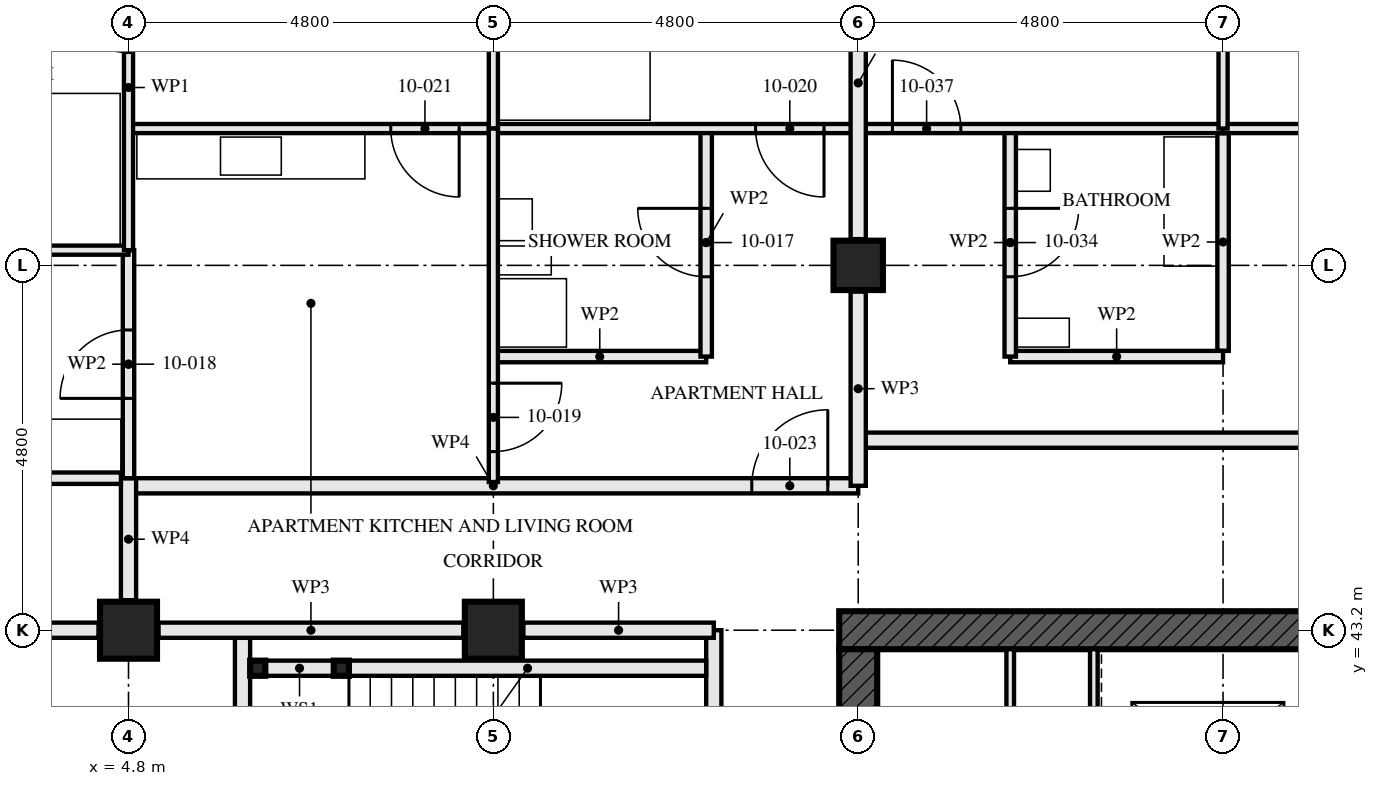
"""IFC4 building model, lengths in metres.
Left out: names, types, materials, properties, quantities, classifications, styles, units other than length and angle.
Written with IfcOpenShell. Run it as: python <this file> out.ifc"""

import sys

from ifc_helpers import new_model, si_unit, direction, frame, frame_2d, origin, origin_2d, place, context, subcontext, project, spatial, rectangle, hollow_rectangle, extrude, element, fill, save


model = new_model("IFC4")
c1 = context("Model", 3, precision=1e-05, world=origin(), true_north=direction((0.0, 1.0)))
c2 = subcontext(c1, "Body", "Model", "MODEL_VIEW")
j1 = project(units=[si_unit("LENGTHUNIT", "METRE"), si_unit("PLANEANGLEUNIT", "RADIAN")], contexts=[c1])
p1 = place(None, origin())
s1 = spatial("IfcSite", under=j1, at=p1, CompositionType="ELEMENT")
p2 = place(p1, origin())
s2 = spatial("IfcBuilding", under=s1, at=p2, CompositionType="ELEMENT")
p3 = place(p2, frame((0.0, 0.0, 41.0)))
s3 = spatial("IfcBuildingStorey", under=s2, at=p3, CompositionType="ELEMENT", Elevation=41.0)
for number, where, z_axis, x_axis in (
    (1, (4.8, 43.2, 0.0), (0.0, 0.0, 1.0), (0.0, 1.0, 0.0)),
    (2, (9.6, 43.2, 0.0), (0.0, 0.0, 1.0), (0.0, 1.0, 0.0)),
):
    element("IfcColumn", number, at=place(p3, frame(where, z_axis=z_axis, x_axis=x_axis)), inside=s3, PredefinedType="COLUMN", context=c2, shape_type="SweptSolid", body=[
        extrude(hollow_rectangle(XDim=0.75, YDim=0.75, WallThickness=0.08, at=origin_2d()), origin(), (0.0, 0.0, 1.0), 3.5),
    ])
p4 = place(p3, frame((14.4, 48.0, 0.0), z_axis=(0.0, 0.0, 1.0), x_axis=(1.0, 0.0, 0.0)))
e3 = element("IfcColumn", 3, at=p4, inside=s3, PredefinedType="COLUMN", context=c2, shape_type="SweptSolid", body=[
    extrude(hollow_rectangle(XDim=0.65, YDim=0.65, WallThickness=0.05, at=origin_2d()), origin(), (0.0, 0.0, 1.0), 3.5),
])
p5 = place(p3, frame((29.05, 43.2, -0.17), z_axis=(0.0, 0.0, 1.0), x_axis=(-1.0, 0.0, 0.0)))
e4 = element("IfcWall", 4, at=p5, inside=s3, PredefinedType="SHEAR", context=c2, shape_type="SweptSolid", body=[
    extrude(rectangle(XDim=14.9, YDim=0.5, at=frame_2d((7.45, 0.0))), origin(), (0.0, 0.0, 1.0), 3.5),
])
p6 = place(p5, frame((6.85, 0.0, 0.17)))
e5 = element("IfcOpeningElement", 5, at=p6, cuts=e4, PredefinedType="OPENING", context=c2, shape_type="SweptSolid", body=[
    extrude(rectangle(XDim=1.2, YDim=2.1, at=frame_2d((0.6, 1.05))), frame((0.0, 0.26, 0.0), z_axis=(0.0, -1.0, 0.0), x_axis=(1.0, 0.0, 0.0)), (0.0, 0.0, 1.0), 0.521),
])
p7 = place(p3, frame((14.4, 42.95, -0.17), z_axis=(0.0, 0.0, 1.0), x_axis=(0.0, -1.0, 0.0)))
e6 = element("IfcWall", 6, at=p7, inside=s3, PredefinedType="SHEAR", context=c2, shape_type="SweptSolid", body=[
    extrude(rectangle(XDim=13.9, YDim=0.5, at=frame_2d((6.95, 0.0))), origin(), (0.0, 0.0, 1.0), 3.5),
])
p8 = place(p7, frame((6.35, 0.0, 0.17)))
e7 = element("IfcOpeningElement", 7, at=p8, cuts=e6, PredefinedType="OPENING", context=c2, shape_type="SweptSolid", body=[
    extrude(rectangle(XDim=1.2, YDim=2.1, at=frame_2d((0.6, 1.05))), frame((0.0, 0.26, 0.0), z_axis=(0.0, -1.0, 0.0), x_axis=(1.0, 0.0, 0.0)), (0.0, 0.0, 1.0), 0.521),
])
for number, where, z_axis, x_axis in (
    (8, (6.5, 42.7, 0.0), (0.0, 0.0, 1.0), (1.0, 0.0, 0.0)),
    (9, (7.6, 42.7, 0.0), (0.0, 0.0, 1.0), (1.0, 0.0, 0.0)),
):
    element("IfcColumn", number, at=place(p3, frame(where, z_axis=z_axis, x_axis=x_axis)), inside=s3, PredefinedType="COLUMN", context=c2, shape_type="SweptSolid", body=[
        extrude(hollow_rectangle(XDim=0.2, YDim=0.2, WallThickness=0.008, at=origin_2d()), origin(), (0.0, 0.0, 1.0), 3.33),
    ])
p9 = place(p3, frame((6.6, 42.7, 0.0), z_axis=(0.0, 0.0, 1.0), x_axis=(1.0, 0.0, 0.0)))
e10 = element("IfcWall", 10, at=p9, inside=s3, PredefinedType="SOLIDWALL", context=c2, shape_type="SweptSolid", body=[
    extrude(rectangle(XDim=0.9, YDim=0.2, at=frame_2d((0.45, 0.0))), origin(), (0.0, 0.0, 1.0), 2.99),
])
p10 = place(p3, frame((7.7, 42.7, 0.0), z_axis=(0.0, 0.0, 1.0), x_axis=(1.0, 0.0, 0.0)))
e11 = element("IfcWall", 11, at=p10, inside=s3, PredefinedType="SOLIDWALL", context=c2, shape_type="SweptSolid", body=[
    extrude(rectangle(XDim=4.7, YDim=0.2, at=frame_2d((2.35, 0.0))), origin(), (0.0, 0.0, 1.0), 2.99),
])
p11 = place(p3, frame((6.3, 43.1, 0.0), z_axis=(0.0, 0.0, 1.0), x_axis=(0.0, -1.0, 0.0)))
e12 = element("IfcWall", 12, at=p11, inside=s3, PredefinedType="SOLIDWALL", context=c2, shape_type="SweptSolid", body=[
    extrude(rectangle(XDim=3.3, YDim=0.2, at=frame_2d((1.65, 0.0))), origin(), (0.0, 0.0, 1.0), 3.33),
])
p12 = place(p3, frame((12.5, 43.2, 0.0), z_axis=(0.0, 0.0, 1.0), x_axis=(0.0, -1.0, 0.0)))
e13 = element("IfcWall", 13, at=p12, inside=s3, PredefinedType="PARTITIONING", context=c2, shape_type="SweptSolid", body=[
    extrude(rectangle(XDim=14.4, YDim=0.2, at=frame_2d((7.2, 0.0))), origin(), (0.0, 0.0, 1.0), 2.55),
])
p13 = place(p12, frame((1.4, 0.0, 0.0)))
e14 = element("IfcOpeningElement", 14, at=p13, cuts=e13, PredefinedType="OPENING", context=c2, shape_type="SweptSolid", body=[
    extrude(rectangle(XDim=1.0, YDim=2.1, at=frame_2d((0.5, 1.05))), frame((0.0, 0.111, 0.0), z_axis=(0.0, -1.0, 0.0), x_axis=(1.0, 0.0, 0.0)), (0.0, 0.0, 1.0), 0.221),
])
p14 = place(p12, frame((10.0, 0.0, 0.0)))
e15 = element("IfcOpeningElement", 15, at=p14, cuts=e13, PredefinedType="OPENING", context=c2, shape_type="SweptSolid", body=[
    extrude(rectangle(XDim=1.0, YDim=2.1, at=frame_2d((0.5, 1.05))), frame((0.0, 0.111, 0.0), z_axis=(0.0, -1.0, 0.0), x_axis=(1.0, 0.0, 0.0)), (0.0, 0.0, 1.0), 0.221),
])
p15 = place(p3, frame((12.4, 49.8, 0.0), z_axis=(0.0, 0.0, 1.0), x_axis=(0.0, -1.0, 0.0)))
e16 = element("IfcWall", 16, at=p15, inside=s3, PredefinedType="PARTITIONING", context=c2, shape_type="SweptSolid", body=[
    extrude(rectangle(XDim=3.0, YDim=0.15, at=frame_2d((1.5, 0.0))), origin(), (0.0, 0.0, 1.0), 2.55),
])
p16 = place(p15, frame((1.05, 0.0, 0.0)))
e17 = element("IfcOpeningElement", 17, at=p16, cuts=e16, PredefinedType="OPENING", context=c2, shape_type="SweptSolid", body=[
    extrude(rectangle(XDim=0.9, YDim=2.1, at=frame_2d((0.45, 1.05))), frame((0.0, 0.085, 0.0), z_axis=(0.0, -1.0, 0.0), x_axis=(1.0, 0.0, 0.0)), (0.0, 0.0, 1.0), 0.171),
])
p17 = place(p3, frame((12.4, 46.8, 0.0), z_axis=(0.0, 0.0, 1.0), x_axis=(-1.0, 0.0, 0.0)))
e18 = element("IfcWall", 18, at=p17, inside=s3, PredefinedType="PARTITIONING", context=c2, shape_type="SweptSolid", body=[
    extrude(rectangle(XDim=2.8, YDim=0.15, at=frame_2d((1.4, 0.0))), origin(), (0.0, 0.0, 1.0), 3.33),
])
p18 = place(p3, frame((4.8, 48.2, 0.0), z_axis=(0.0, 0.0, 1.0), x_axis=(0.0, -1.0, 0.0)))
e19 = element("IfcWall", 19, at=p18, inside=s3, PredefinedType="PARTITIONING", context=c2, shape_type="SweptSolid", body=[
    extrude(rectangle(XDim=3.0, YDim=0.15, at=frame_2d((1.5, 0.0))), origin(), (0.0, 0.0, 1.0), 2.55),
])
p19 = place(p18, frame((1.05, 0.0, 0.0)))
e20 = element("IfcOpeningElement", 20, at=p19, cuts=e19, PredefinedType="OPENING", context=c2, shape_type="SweptSolid", body=[
    extrude(rectangle(XDim=0.9, YDim=2.1, at=frame_2d((0.45, 1.05))), frame((0.0, 0.085, 0.0), z_axis=(0.0, -1.0, 0.0), x_axis=(1.0, 0.0, 0.0)), (0.0, 0.0, 1.0), 0.171),
])
p20 = place(p3, frame((9.6, 49.8, 0.0), z_axis=(0.0, 0.0, 1.0), x_axis=(0.0, -1.0, 0.0)))
e21 = element("IfcWall", 21, at=p20, inside=s3, PredefinedType="PARTITIONING", context=c2, shape_type="SweptSolid", body=[
    extrude(rectangle(XDim=4.65, YDim=0.12, at=frame_2d((2.325, 0.0))), origin(), (0.0, 0.0, 1.0), 2.55),
])
p21 = place(p20, frame((3.35, 0.0, 0.0)))
e22 = element("IfcOpeningElement", 22, at=p21, cuts=e21, PredefinedType="OPENING", context=c2, shape_type="SweptSolid", body=[
    extrude(rectangle(XDim=0.9, YDim=2.1, at=frame_2d((0.45, 1.05))), frame((0.0, 0.071, 0.0), z_axis=(0.0, -1.0, 0.0), x_axis=(1.0, 0.0, 0.0)), (0.0, 0.0, 1.0), 0.141),
])
p22 = place(p3, frame((14.4, 49.8, 0.0), z_axis=(0.0, 0.0, 1.0), x_axis=(-1.0, 0.0, 0.0)))
e23 = element("IfcWall", 23, at=p22, inside=s3, PredefinedType="PARTITIONING", context=c2, shape_type="SweptSolid", body=[
    extrude(rectangle(XDim=4.8, YDim=0.12, at=frame_2d((2.4, 0.0))), origin(), (0.0, 0.0, 1.0), 3.33),
])
p23 = place(p22, frame((0.45, 0.0, 0.0)))
e24 = element("IfcOpeningElement", 24, at=p23, cuts=e23, PredefinedType="OPENING", context=c2, shape_type="SweptSolid", body=[
    extrude(rectangle(XDim=0.9, YDim=2.1, at=frame_2d((0.45, 1.05))), frame((0.0, 0.071, 0.0), z_axis=(0.0, -1.0, 0.0), x_axis=(1.0, 0.0, 0.0)), (0.0, 0.0, 1.0), 0.141),
])
p24 = place(p3, frame((9.6, 49.8, 0.0), z_axis=(0.0, 0.0, 1.0), x_axis=(-1.0, 0.0, 0.0)))
e25 = element("IfcWall", 25, at=p24, inside=s3, PredefinedType="PARTITIONING", context=c2, shape_type="SweptSolid", body=[
    extrude(rectangle(XDim=4.8, YDim=0.12, at=frame_2d((2.4, 0.0))), origin(), (0.0, 0.0, 1.0), 3.33),
])
p25 = place(p24, frame((0.45, 0.0, 0.0)))
e26 = element("IfcOpeningElement", 26, at=p25, cuts=e25, PredefinedType="OPENING", context=c2, shape_type="SweptSolid", body=[
    extrude(rectangle(XDim=0.9, YDim=2.1, at=frame_2d((0.45, 1.05))), frame((0.0, 0.071, 0.0), z_axis=(0.0, -1.0, 0.0), x_axis=(1.0, 0.0, 0.0)), (0.0, 0.0, 1.0), 0.141),
])
p26 = place(p3, frame((4.8, 48.2, 0.0), z_axis=(0.0, 0.0, 1.0), x_axis=(-1.0, 0.0, 0.0)))
e27 = element("IfcWall", 27, at=p26, inside=s3, PredefinedType="PARTITIONING", context=c2, shape_type="SweptSolid", body=[
    extrude(rectangle(XDim=4.48, YDim=0.12, at=frame_2d((2.24, 0.0))), origin(), (0.0, 0.0, 1.0), 3.33),
])
p27 = place(p3, frame((9.6, 57.28, 0.0), z_axis=(0.0, 0.0, 1.0), x_axis=(0.0, -1.0, 0.0)))
e28 = element("IfcWall", 28, at=p27, inside=s3, PredefinedType="PARTITIONING", context=c2, shape_type="SweptSolid", body=[
    extrude(rectangle(XDim=7.48, YDim=0.12, at=frame_2d((3.74, 0.0))), origin(), (0.0, 0.0, 1.0), 2.55),
])
p28 = place(p3, frame((4.8, 52.48, 0.0), z_axis=(0.0, 0.0, 1.0), x_axis=(0.0, -1.0, 0.0)))
e29 = element("IfcWall", 29, at=p28, inside=s3, PredefinedType="PARTITIONING", context=c2, shape_type="SweptSolid", body=[
    extrude(rectangle(XDim=4.28, YDim=0.12, at=frame_2d((2.14, 0.0))), origin(), (0.0, 0.0, 1.0), 3.33),
])
p29 = place(p28, frame((0.78, 0.0, 0.0)))
e30 = element("IfcOpeningElement", 30, at=p29, cuts=e29, PredefinedType="OPENING", context=c2, shape_type="SweptSolid", body=[
    extrude(rectangle(XDim=0.9, YDim=2.1, at=frame_2d((0.45, 1.05))), frame((0.0, 0.071, 0.0), z_axis=(0.0, -1.0, 0.0), x_axis=(1.0, 0.0, 0.0)), (0.0, 0.0, 1.0), 0.141),
])
p30 = place(p3, frame((14.4, 45.1, 0.0), z_axis=(0.0, 0.0, 1.0), x_axis=(-1.0, 0.0, 0.0)))
e31 = element("IfcWall", 31, at=p30, inside=s3, PredefinedType="PARTITIONING", context=c2, shape_type="SweptSolid", body=[
    extrude(rectangle(XDim=9.6, YDim=0.2, at=frame_2d((4.8, 0.0))), origin(), (0.0, 0.0, 1.0), 3.33),
])
p31 = place(p30, frame((0.4, 0.0, 0.0)))
e32 = element("IfcOpeningElement", 32, at=p31, cuts=e31, PredefinedType="OPENING", context=c2, shape_type="SweptSolid", body=[
    extrude(rectangle(XDim=1.0, YDim=2.1, at=frame_2d((0.5, 1.05))), frame((0.0, 0.111, 0.0), z_axis=(0.0, -1.0, 0.0), x_axis=(1.0, 0.0, 0.0)), (0.0, 0.0, 1.0), 0.221),
])
p32 = place(p3, frame((4.8, 45.2, 0.0), z_axis=(0.0, 0.0, 1.0), x_axis=(0.0, -1.0, 0.0)))
e33 = element("IfcWall", 33, at=p32, inside=s3, PredefinedType="PARTITIONING", context=c2, shape_type="SweptSolid", body=[
    extrude(rectangle(XDim=1.605, YDim=0.2, at=frame_2d((0.802, 0.0))), origin(), (0.0, 0.0, 1.0), 3.33),
])
p33 = place(p3, frame((16.4, 49.8, 0.0), z_axis=(0.0, 0.0, 1.0), x_axis=(0.0, -1.0, 0.0)))
e34 = element("IfcWall", 34, at=p33, inside=s3, PredefinedType="PARTITIONING", context=c2, shape_type="SweptSolid", body=[
    extrude(rectangle(XDim=3.0, YDim=0.15, at=frame_2d((1.5, 0.0))), origin(), (0.0, 0.0, 1.0), 2.55),
])
p34 = place(p33, frame((1.05, 0.0, 0.0)))
e35 = element("IfcOpeningElement", 35, at=p34, cuts=e34, PredefinedType="OPENING", context=c2, shape_type="SweptSolid", body=[
    extrude(rectangle(XDim=0.9, YDim=2.1, at=frame_2d((0.45, 1.05))), frame((0.0, 0.085, 0.0), z_axis=(0.0, -1.0, 0.0), x_axis=(1.0, 0.0, 0.0)), (0.0, 0.0, 1.0), 0.171),
])
p35 = place(p3, frame((19.2, 46.8, 0.0), z_axis=(0.0, 0.0, 1.0), x_axis=(-1.0, 0.0, 0.0)))
e36 = element("IfcWall", 36, at=p35, inside=s3, PredefinedType="PARTITIONING", context=c2, shape_type="SweptSolid", body=[
    extrude(rectangle(XDim=2.8, YDim=0.15, at=frame_2d((1.4, 0.0))), origin(), (0.0, 0.0, 1.0), 3.33),
])
p36 = place(p3, frame((24.0, 49.8, 0.0), z_axis=(0.0, 0.0, 1.0), x_axis=(-1.0, 0.0, 0.0)))
e37 = element("IfcWall", 37, at=p36, inside=s3, PredefinedType="PARTITIONING", context=c2, shape_type="SweptSolid", body=[
    extrude(rectangle(XDim=4.8, YDim=0.12, at=frame_2d((2.4, 0.0))), origin(), (0.0, 0.0, 1.0), 3.33),
])
p37 = place(p36, frame((0.45, 0.0, 0.0)))
e38 = element("IfcOpeningElement", 38, at=p37, cuts=e37, PredefinedType="OPENING", context=c2, shape_type="SweptSolid", body=[
    extrude(rectangle(XDim=0.9, YDim=2.1, at=frame_2d((0.45, 1.05))), frame((0.0, 0.071, 0.0), z_axis=(0.0, -1.0, 0.0), x_axis=(1.0, 0.0, 0.0)), (0.0, 0.0, 1.0), 0.141),
])
p38 = place(p3, frame((19.2, 49.8, 0.0), z_axis=(0.0, 0.0, 1.0), x_axis=(-1.0, 0.0, 0.0)))
e39 = element("IfcWall", 39, at=p38, inside=s3, PredefinedType="PARTITIONING", context=c2, shape_type="SweptSolid", body=[
    extrude(rectangle(XDim=4.8, YDim=0.12, at=frame_2d((2.4, 0.0))), origin(), (0.0, 0.0, 1.0), 3.33),
])
p39 = place(p38, frame((3.45, 0.0, 0.0)))
e40 = element("IfcOpeningElement", 40, at=p39, cuts=e39, PredefinedType="OPENING", context=c2, shape_type="SweptSolid", body=[
    extrude(rectangle(XDim=0.9, YDim=2.1, at=frame_2d((0.45, 1.05))), frame((0.0, 0.071, 0.0), z_axis=(0.0, -1.0, 0.0), x_axis=(1.0, 0.0, 0.0)), (0.0, 0.0, 1.0), 0.141),
])
p40 = place(p3, frame((19.2, 57.255, 0.0), z_axis=(0.0, 0.0, 1.0), x_axis=(0.0, -1.0, 0.0)))
e41 = element("IfcWall", 41, at=p40, inside=s3, PredefinedType="PARTITIONING", context=c2, shape_type="SweptSolid", body=[
    extrude(rectangle(XDim=7.455, YDim=0.12, at=frame_2d((3.728, 0.0))), origin(), (0.0, 0.0, 1.0), 2.55),
])
p41 = place(p3, frame((28.8, 45.7, 0.0), z_axis=(0.0, 0.0, 1.0), x_axis=(-1.0, 0.0, 0.0)))
e42 = element("IfcWall", 42, at=p41, inside=s3, PredefinedType="PARTITIONING", context=c2, shape_type="SweptSolid", body=[
    extrude(rectangle(XDim=14.4, YDim=0.2, at=frame_2d((7.2, 0.0))), origin(), (0.0, 0.0, 1.0), 3.33),
])
p42 = place(p41, frame((0.4, 0.0, 0.0)))
e43 = element("IfcOpeningElement", 43, at=p42, cuts=e42, PredefinedType="OPENING", context=c2, shape_type="SweptSolid", body=[
    extrude(rectangle(XDim=1.0, YDim=2.1, at=frame_2d((0.5, 1.05))), frame((0.0, 0.111, 0.0), z_axis=(0.0, -1.0, 0.0), x_axis=(1.0, 0.0, 0.0)), (0.0, 0.0, 1.0), 0.221),
])
for number, where, z_axis, x_axis in (
    (44, (16.4, 37.15, 0.0), (0.0, 0.0, 1.0), (0.0, 1.0, 0.0)),
    (45, (17.5, 37.15, 0.0), (0.0, 0.0, 1.0), (0.0, 1.0, 0.0)),
):
    element("IfcWall", number, at=place(p3, frame(where, z_axis=z_axis, x_axis=x_axis)), inside=s3, PredefinedType="SOLIDWALL", context=c2, shape_type="SweptSolid", body=[
        extrude(rectangle(XDim=5.8, YDim=0.1, at=frame_2d((2.9, 0.0))), origin(), (0.0, 0.0, 1.0), 3.33),
    ])
p43 = place(p3, frame((12.5, 43.2, 0.0), z_axis=(0.0, 0.0, 1.0), x_axis=(-1.0, 0.0, 0.0)))
e46 = element("IfcWall", 46, at=p43, inside=s3, PredefinedType="PARTITIONING", context=c2, shape_type="SweptSolid", body=[
    extrude(rectangle(XDim=2.505, YDim=0.2, at=frame_2d((1.252, 0.0))), origin(), (0.0, 0.0, 1.0), 2.32),
])
p44 = place(p3, frame((9.205, 43.2, 0.0), z_axis=(0.0, 0.0, 1.0), x_axis=(-1.0, 0.0, 0.0)))
e47 = element("IfcWall", 47, at=p44, inside=s3, PredefinedType="PARTITIONING", context=c2, shape_type="SweptSolid", body=[
    extrude(rectangle(XDim=4.01, YDim=0.2, at=frame_2d((2.005, 0.0))), origin(), (0.0, 0.0, 1.0), 2.32),
])
p45 = place(p3, frame((4.405, 43.2, 0.0), z_axis=(0.0, 0.0, 1.0), x_axis=(-1.0, 0.0, 0.0)))
e48 = element("IfcWall", 48, at=p45, inside=s3, PredefinedType="PARTITIONING", context=c2, shape_type="SweptSolid", body=[
    extrude(rectangle(XDim=4.085, YDim=0.2, at=frame_2d((2.042, 0.0))), origin(), (0.0, 0.0, 1.0), 2.32),
])
p46 = place(p3, frame((14.4, 45.1, 0.0), z_axis=(0.0, 0.0, 1.0), x_axis=(0.0, 1.0, 0.0)))
e49 = element("IfcWall", 49, at=p46, inside=s3, PredefinedType="PARTITIONING", context=c2, shape_type="SweptSolid", body=[
    extrude(rectangle(XDim=2.555, YDim=0.2, at=frame_2d((1.277, 0.0))), origin(), (0.0, 0.0, 1.0), 2.32),
])
p47 = place(p3, frame((14.4, 48.345, 0.0), z_axis=(0.0, 0.0, 1.0), x_axis=(0.0, 1.0, 0.0)))
e50 = element("IfcWall", 50, at=p47, inside=s3, PredefinedType="PARTITIONING", context=c2, shape_type="SweptSolid", body=[
    extrude(rectangle(XDim=4.11, YDim=0.2, at=frame_2d((2.055, 0.0))), origin(), (0.0, 0.0, 1.0), 2.32),
])
p48 = place(p3, frame((4.7, 45.2, 0.0), z_axis=(0.0, 0.0, 1.0), x_axis=(-1.0, 0.0, 0.0)))
e51 = element("IfcWall", 51, at=p48, inside=s3, PredefinedType="PARTITIONING", context=c2, shape_type="SweptSolid", body=[
    extrude(rectangle(XDim=5.135, YDim=0.15, at=frame_2d((2.567, 0.0))), origin(), (0.0, 0.0, 1.0), 2.32),
])
p49 = place(p3, frame((19.2, 49.74, 0.0), z_axis=(0.0, 0.0, 1.0), x_axis=(0.0, -1.0, 0.0)))
e52 = element("IfcWall", 52, at=p49, inside=s3, PredefinedType="PARTITIONING", context=c2, shape_type="SweptSolid", body=[
    extrude(rectangle(XDim=2.865, YDim=0.15, at=frame_2d((1.433, 0.0))), origin(), (0.0, 0.0, 1.0), 2.55),
])
p50 = place(p16, frame((0.9, 0.0, 0.0), z_axis=(0.0, 0.0, 1.0), x_axis=(-1.0, 0.0, 0.0)))
e53 = element("IfcDoor", 53, at=p50, inside=s3, OperationType="SINGLE_SWING_LEFT", PredefinedType="DOOR", context=c2, shape_type="SweptSolid", body=[
    extrude(rectangle(XDim=0.9, YDim=2.1, at=frame_2d((0.45, 1.05))), frame((0.0, 0.022, 0.0), z_axis=(0.0, -1.0, 0.0), x_axis=(1.0, 0.0, 0.0)), (0.0, 0.0, 1.0), 0.044),
])
fill(e17, e53)
p51 = place(p19, frame((0.9, 0.0, 0.0), z_axis=(0.0, 0.0, 1.0), x_axis=(-1.0, 0.0, 0.0)))
e54 = element("IfcDoor", 54, at=p51, inside=s3, OperationType="SINGLE_SWING_RIGHT", PredefinedType="DOOR", context=c2, shape_type="SweptSolid", body=[
    extrude(rectangle(XDim=0.9, YDim=2.1, at=frame_2d((0.45, 1.05))), frame((0.0, 0.022, 0.0), z_axis=(0.0, -1.0, 0.0), x_axis=(1.0, 0.0, 0.0)), (0.0, 0.0, 1.0), 0.044),
])
fill(e20, e54)
p52 = place(p21, origin())
e55 = element("IfcDoor", 55, at=p52, inside=s3, OperationType="SINGLE_SWING_RIGHT", PredefinedType="DOOR", context=c2, shape_type="SweptSolid", body=[
    extrude(rectangle(XDim=0.9, YDim=2.1, at=frame_2d((0.45, 1.05))), frame((0.0, 0.022, 0.0), z_axis=(0.0, -1.0, 0.0), x_axis=(1.0, 0.0, 0.0)), (0.0, 0.0, 1.0), 0.044),
])
fill(e22, e55)
p53 = place(p23, origin())
e56 = element("IfcDoor", 56, at=p53, inside=s3, OperationType="SINGLE_SWING_RIGHT", PredefinedType="DOOR", context=c2, shape_type="SweptSolid", body=[
    extrude(rectangle(XDim=0.9, YDim=2.1, at=frame_2d((0.45, 1.05))), frame((0.0, 0.022, 0.0), z_axis=(0.0, -1.0, 0.0), x_axis=(1.0, 0.0, 0.0)), (0.0, 0.0, 1.0), 0.044),
])
fill(e24, e56)
p54 = place(p25, origin())
e57 = element("IfcDoor", 57, at=p54, inside=s3, OperationType="SINGLE_SWING_RIGHT", PredefinedType="DOOR", context=c2, shape_type="SweptSolid", body=[
    extrude(rectangle(XDim=0.9, YDim=2.1, at=frame_2d((0.45, 1.05))), frame((0.0, 0.022, 0.0), z_axis=(0.0, -1.0, 0.0), x_axis=(1.0, 0.0, 0.0)), (0.0, 0.0, 1.0), 0.044),
])
fill(e26, e57)
p55 = place(p31, frame((1.0, 0.0, 0.0), z_axis=(0.0, 0.0, 1.0), x_axis=(-1.0, 0.0, 0.0)))
e58 = element("IfcDoor", 58, at=p55, inside=s3, OperationType="SINGLE_SWING_LEFT", PredefinedType="DOOR", context=c2, shape_type="SweptSolid", body=[
    extrude(rectangle(XDim=1.0, YDim=2.1, at=frame_2d((0.5, 1.05))), frame((0.0, 0.027, 0.0), z_axis=(0.0, -1.0, 0.0), x_axis=(1.0, 0.0, 0.0)), (0.0, 0.0, 1.0), 0.054),
])
fill(e32, e58)
p56 = place(p34, origin())
e59 = element("IfcDoor", 59, at=p56, inside=s3, OperationType="SINGLE_SWING_RIGHT", PredefinedType="DOOR", context=c2, shape_type="SweptSolid", body=[
    extrude(rectangle(XDim=0.9, YDim=2.1, at=frame_2d((0.45, 1.05))), frame((0.0, 0.022, 0.0), z_axis=(0.0, -1.0, 0.0), x_axis=(1.0, 0.0, 0.0)), (0.0, 0.0, 1.0), 0.044),
])
fill(e35, e59)
p57 = place(p39, frame((0.9, 0.0, 0.0), z_axis=(0.0, 0.0, 1.0), x_axis=(-1.0, 0.0, 0.0)))
e60 = element("IfcDoor", 60, at=p57, inside=s3, OperationType="SINGLE_SWING_RIGHT", PredefinedType="DOOR", context=c2, shape_type="SweptSolid", body=[
    extrude(rectangle(XDim=0.9, YDim=2.1, at=frame_2d((0.45, 1.05))), frame((0.0, 0.022, 0.0), z_axis=(0.0, -1.0, 0.0), x_axis=(1.0, 0.0, 0.0)), (0.0, 0.0, 1.0), 0.044),
])
fill(e40, e60)
save(model, sys.argv[1])
